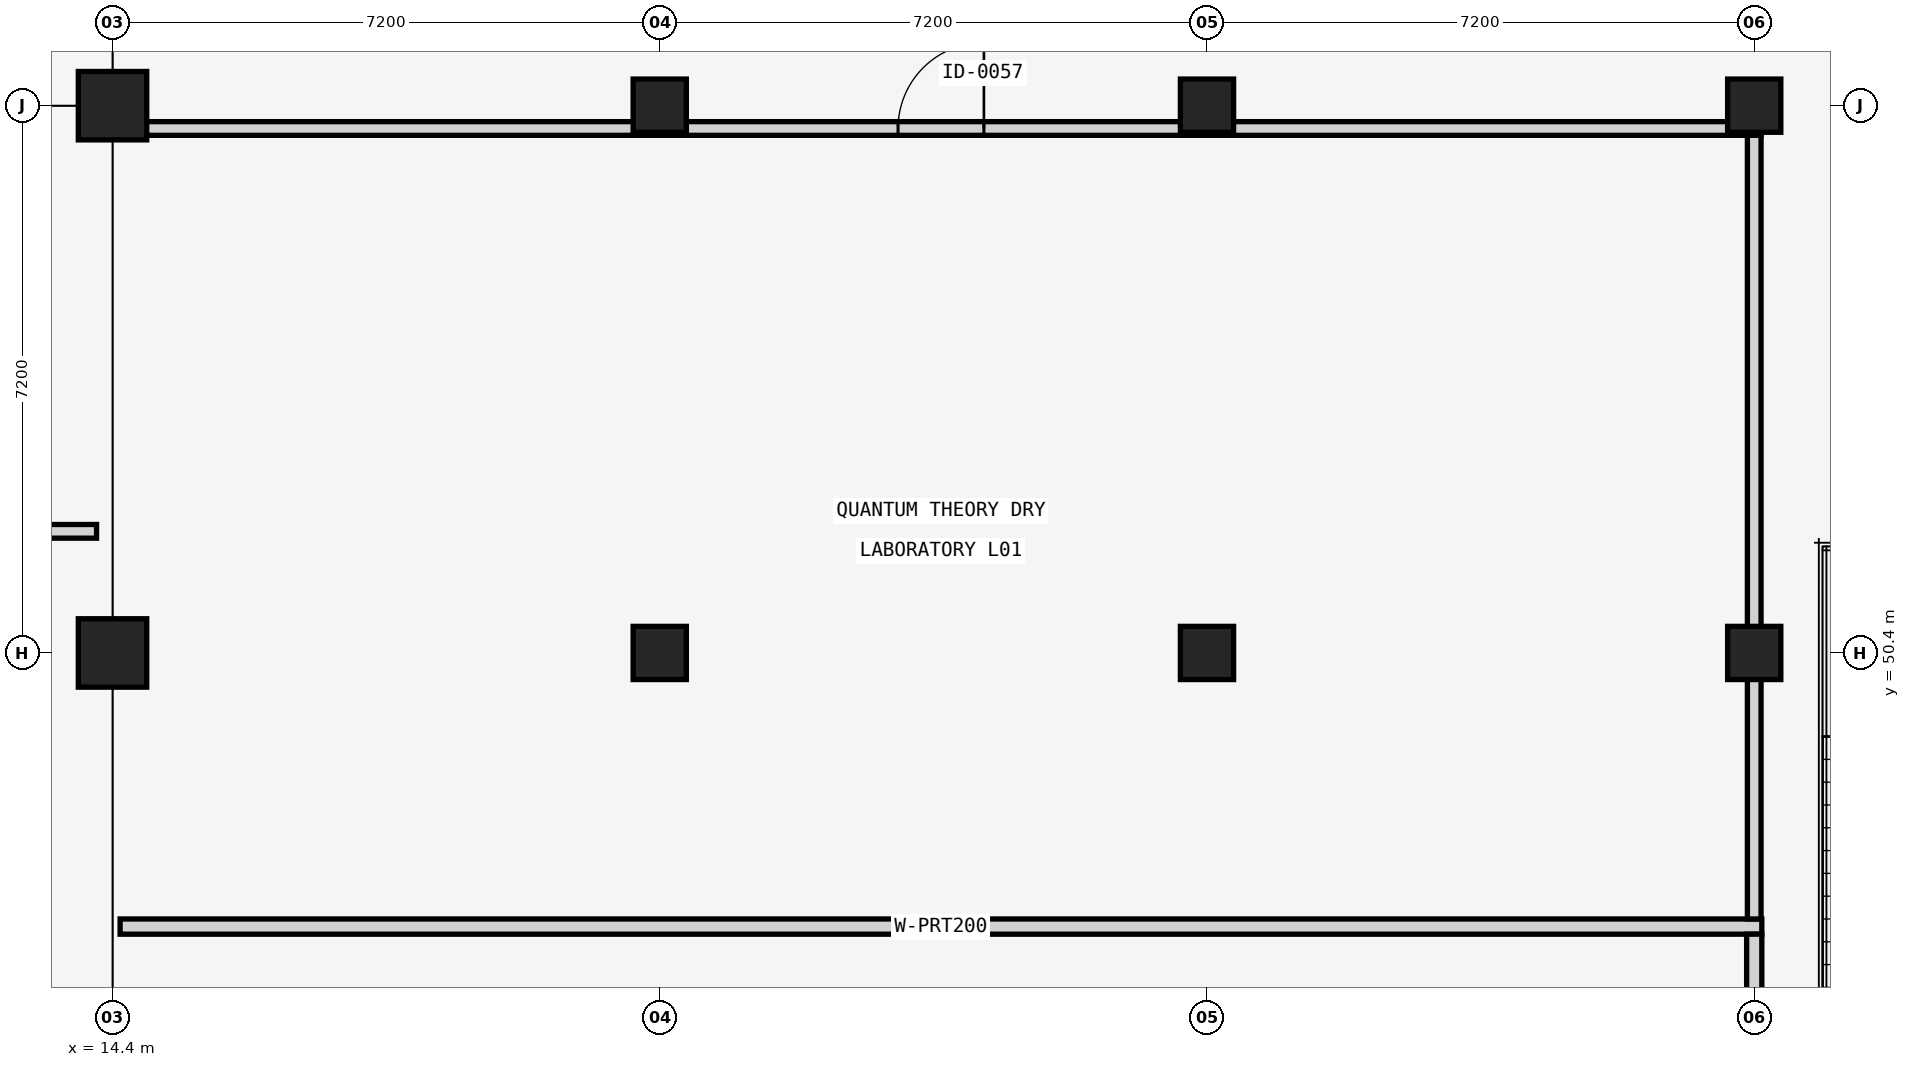
"""IFC4 building model, lengths in metres.
Left out: names, types, materials, properties, quantities, classifications, styles, units other than length and angle.
Written with IfcOpenShell. Run it as: python <this file> out.ifc"""

import sys

from ifc_helpers import new_model, si_unit, direction, frame, frame_2d, origin, origin_2d, place, context, subcontext, project, spatial, rectangle, extrude, element, fill, save


model = new_model("IFC4")
c1 = context("Model", 3, precision=1e-05, world=origin(), true_north=direction((0.0, 1.0)))
c2 = subcontext(c1, "Body", "Model", "MODEL_VIEW")
j1 = project(units=[si_unit("LENGTHUNIT", "METRE"), si_unit("PLANEANGLEUNIT", "RADIAN")], contexts=[c1])
p1 = place(None, origin())
s1 = spatial("IfcSite", under=j1, at=p1, CompositionType="ELEMENT")
p2 = place(p1, origin())
s2 = spatial("IfcBuilding", under=s1, at=p2, CompositionType="ELEMENT")
p3 = place(p2, frame((0.0, 0.0, 4.8)))
s3 = spatial("IfcBuildingStorey", under=s2, at=p3, CompositionType="ELEMENT", Elevation=4.8)
for number, where, z_axis, x_axis in (
    (1, (14.4, 50.4, 0.0), (0.0, 0.0, 1.0), (1.0, 0.0, 0.0)),
    (2, (14.4, 57.6, 0.0), (0.0, 0.0, 1.0), (1.0, 0.0, 0.0)),
):
    element("IfcColumn", number, at=place(p3, frame(where, z_axis=z_axis, x_axis=x_axis)), inside=s3, PredefinedType="COLUMN", context=c2, shape_type="SweptSolid", body=[
        extrude(rectangle(XDim=0.9, YDim=0.9, at=origin_2d()), origin(), (0.0, 0.0, 1.0), 4.16),
    ])
for number, where, z_axis, x_axis in (
    (3, (21.6, 50.4, 0.0), (0.0, 0.0, 1.0), (1.0, 0.0, 0.0)),
    (4, (21.6, 57.6, 0.0), (0.0, 0.0, 1.0), (1.0, 0.0, 0.0)),
    (5, (28.8, 50.4, 0.0), (0.0, 0.0, 1.0), (1.0, 0.0, 0.0)),
    (6, (28.8, 57.6, 0.0), (0.0, 0.0, 1.0), (1.0, 0.0, 0.0)),
    (7, (36.0, 50.4, 0.0), (0.0, 0.0, 1.0), (1.0, 0.0, 0.0)),
    (8, (36.0, 57.6, 0.0), (0.0, 0.0, 1.0), (1.0, 0.0, 0.0)),
):
    element("IfcColumn", number, at=place(p3, frame(where, z_axis=z_axis, x_axis=x_axis)), inside=s3, PredefinedType="COLUMN", context=c2, shape_type="SweptSolid", body=[
        extrude(rectangle(XDim=0.7, YDim=0.7, at=origin_2d()), origin(), (0.0, 0.0, 1.0), 4.16),
    ])
p4 = place(p3, frame((10.01, 52.0, 0.0), z_axis=(0.0, 0.0, 1.0), x_axis=(1.0, 0.0, 0.0)))
e9 = element("IfcWall", 9, at=p4, inside=s3, PredefinedType="PARTITIONING", context=c2, shape_type="SweptSolid", body=[
    extrude(rectangle(XDim=4.18, YDim=0.18, at=frame_2d((2.09, 0.0))), origin(), (0.0, 0.0, 1.0), 2.81),
])
p5 = place(p3, frame((14.5, 46.8, 0.0), z_axis=(0.0, 0.0, 1.0), x_axis=(1.0, 0.0, 0.0)))
e10 = element("IfcWall", 10, at=p5, inside=s3, PredefinedType="PARTITIONING", context=c2, shape_type="SweptSolid", body=[
    extrude(rectangle(XDim=21.6, YDim=0.2, at=frame_2d((10.8, 0.0))), origin(), (0.0, 0.0, 1.0), 2.81),
])
p6 = place(p3, frame((36.0, 36.4, 0.0), z_axis=(0.0, 0.0, 1.0), x_axis=(0.0, 1.0, 0.0)))
e11 = element("IfcWall", 11, at=p6, inside=s3, PredefinedType="PARTITIONING", context=c2, shape_type="SweptSolid", body=[
    extrude(rectangle(XDim=10.3, YDim=0.2, at=frame_2d((5.15, 0.0))), origin(), (0.0, 0.0, 1.0), 3.26),
])
p7 = place(p6, frame((3.065, 0.0, 0.0)))
e12 = element("IfcOpeningElement", 12, at=p7, cuts=e11, PredefinedType="OPENING", context=c2, shape_type="SweptSolid", body=[
    extrude(rectangle(XDim=1.08, YDim=2.08, at=frame_2d((0.54, 1.04))), frame((0.0, 0.11, 0.0), z_axis=(0.0, -1.0, 0.0), x_axis=(1.0, 0.0, 0.0)), (0.0, 0.0, 1.0), 0.22),
])
p8 = place(p3, frame((14.51, 57.3, 0.0), z_axis=(0.0, 0.0, 1.0), x_axis=(1.0, 0.0, 0.0)))
e13 = element("IfcWall", 13, at=p8, inside=s3, PredefinedType="PARTITIONING", context=c2, shape_type="SweptSolid", body=[
    extrude(rectangle(XDim=21.58, YDim=0.18, at=frame_2d((10.79, 0.0))), origin(), (0.0, 0.0, 1.0), 2.81),
])
p9 = place(p8, frame((10.225, 0.0, 0.0)))
e14 = element("IfcOpeningElement", 14, at=p9, cuts=e13, PredefinedType="OPENING", context=c2, shape_type="SweptSolid", body=[
    extrude(rectangle(XDim=1.13, YDim=2.08, at=frame_2d((0.565, 1.04))), frame((0.0, 0.1, 0.0), z_axis=(0.0, -1.0, 0.0), x_axis=(1.0, 0.0, 0.0)), (0.0, 0.0, 1.0), 0.2),
])
p10 = place(p3, frame((36.0, 46.9, 0.0), z_axis=(0.0, 0.0, 1.0), x_axis=(0.0, 1.0, 0.0)))
e15 = element("IfcWall", 15, at=p10, inside=s3, PredefinedType="PARTITIONING", context=c2, shape_type="SweptSolid", body=[
    extrude(rectangle(XDim=10.31, YDim=0.18, at=frame_2d((5.155, 0.0))), origin(), (0.0, 0.0, 1.0), 3.26),
])
p11 = place(p9, origin())
e16 = element("IfcDoor", 16, at=p11, inside=s3, OperationType="SINGLE_SWING_RIGHT", PredefinedType="DOOR", context=c2, shape_type="SweptSolid", body=[
    extrude(rectangle(XDim=1.13, YDim=2.08, at=frame_2d((0.565, 1.04))), frame((0.0, 0.025, 0.0), z_axis=(0.0, -1.0, 0.0), x_axis=(1.0, 0.0, 0.0)), (0.0, 0.0, 1.0), 0.05),
])
fill(e14, e16)
save(model, sys.argv[1])
